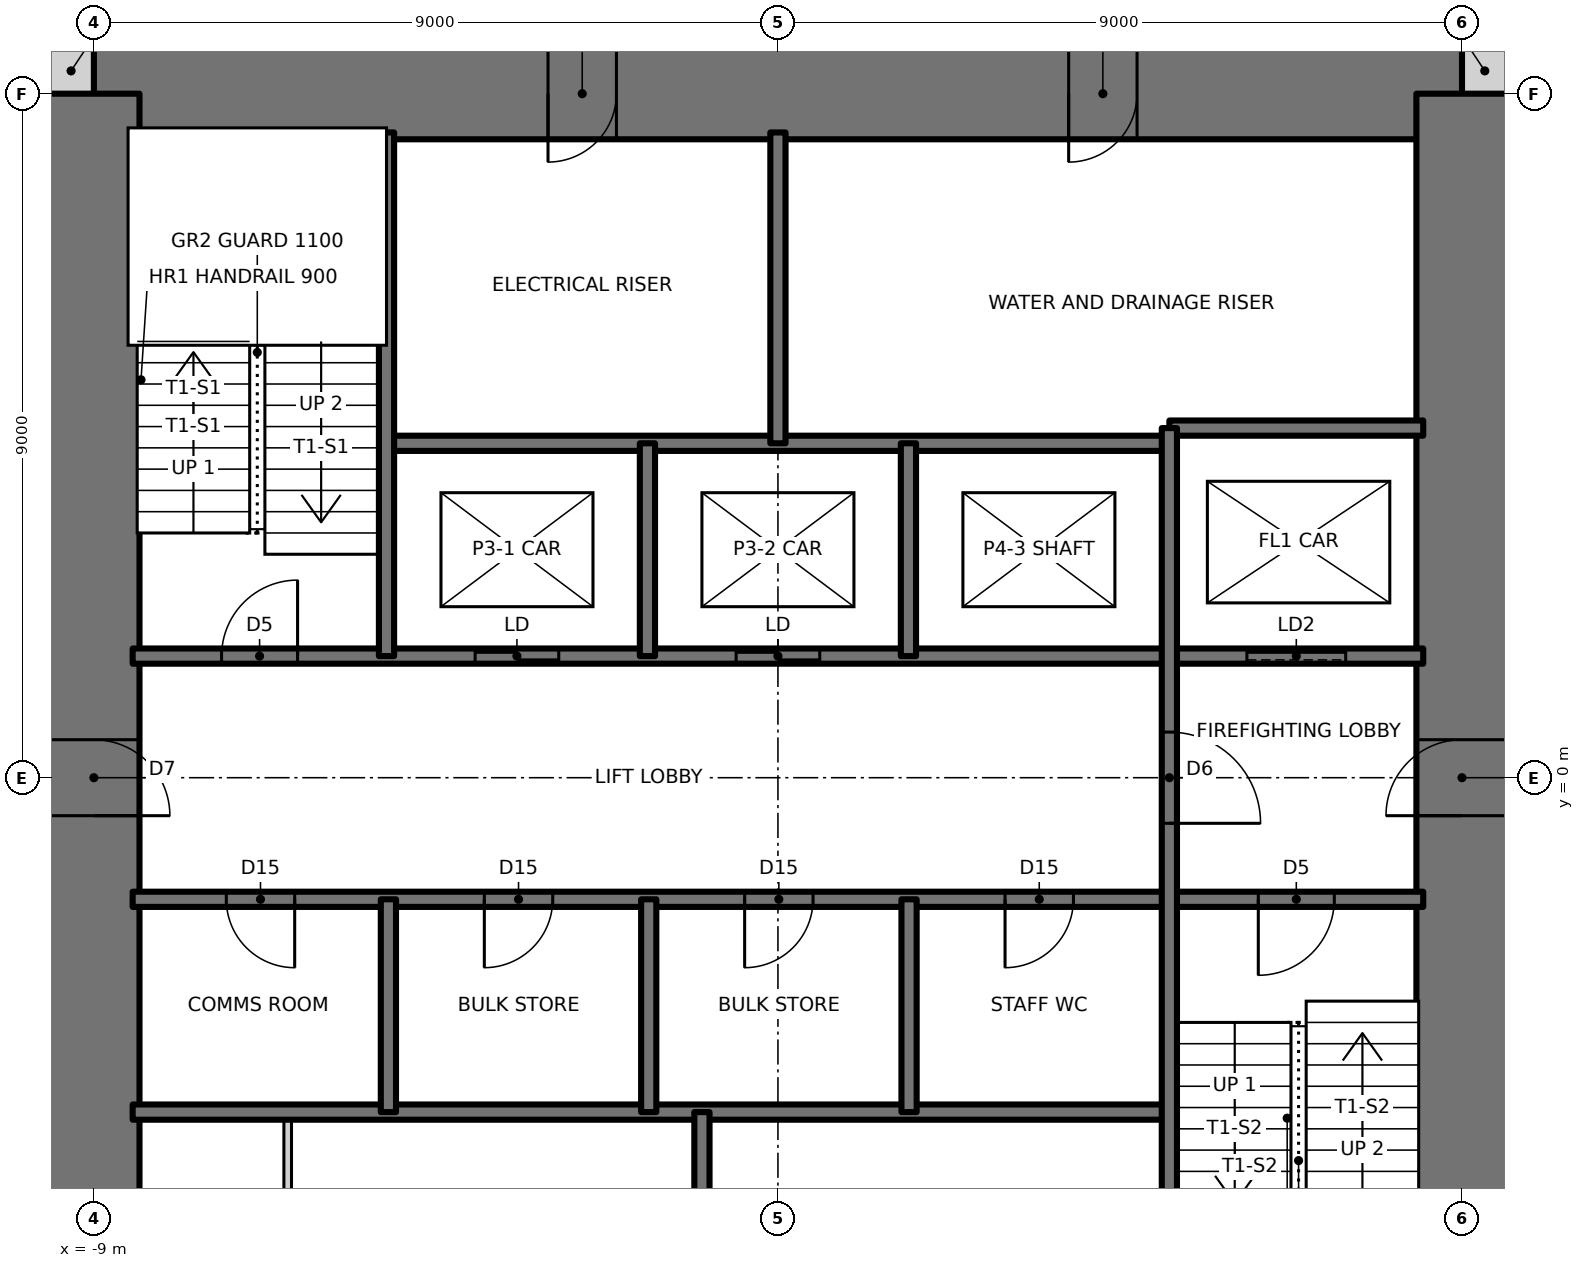
"""IFC4 building model, lengths in metres.
Left out: names, types, materials, properties, quantities, classifications, styles, units other than length and angle.
Written with IfcOpenShell. Run it as: python <this file> out.ifc"""

import sys

from ifc_helpers import new_model, si_unit, direction, frame, frame_2d, origin, place, context, subcontext, project, spatial, rectangle, extrude, element, fill, save


model = new_model("IFC4")
c1 = context("Model", 3, precision=1e-05, world=origin(), true_north=direction((0.0, 1.0)))
c2 = subcontext(c1, "Body", "Model", "MODEL_VIEW")
j1 = project(units=[si_unit("LENGTHUNIT", "METRE"), si_unit("PLANEANGLEUNIT", "RADIAN")], contexts=[c1])
p1 = place(None, origin())
s1 = spatial("IfcSite", under=j1, at=p1, CompositionType="ELEMENT")
p2 = place(p1, origin())
s2 = spatial("IfcBuilding", under=s1, at=p2, CompositionType="ELEMENT")
p3 = place(p2, frame((0.0, 0.0, 181.0)))
s3 = spatial("IfcBuildingStorey", under=s2, at=p3, CompositionType="ELEMENT", Elevation=181.0)
for number, where, z_axis, x_axis in (
    (1, (9.0, 9.3, 0.0), (0.0, 0.0, 1.0), (1.0, 0.0, 0.0)),
    (2, (-9.6, 9.3, 0.0), (0.0, 0.0, 1.0), (1.0, 0.0, 0.0)),
):
    element("IfcWall", number, at=place(p3, frame(where, z_axis=z_axis, x_axis=x_axis)), inside=s3, PredefinedType="SOLIDWALL", context=c2, shape_type="SweptSolid", body=[
        extrude(rectangle(XDim=0.6, YDim=0.6, at=frame_2d((0.3, 0.0))), origin(), (0.0, 0.0, 1.0), 3.5),
    ])
p4 = place(p3, frame((9.0, 9.0, 0.0), z_axis=(0.0, 0.0, 1.0), x_axis=(-1.0, 0.0, 0.0)))
e3 = element("IfcWall", 3, at=p4, inside=s3, PredefinedType="SHEAR", context=c2, shape_type="SweptSolid", body=[
    extrude(rectangle(XDim=18.0, YDim=1.2, at=frame_2d((9.0, 0.0))), origin(), (0.0, 0.0, 1.0), 3.5),
])
p5 = place(p4, frame((11.125, 0.0, 0.0)))
e4 = element("IfcOpeningElement", 4, at=p5, cuts=e3, PredefinedType="OPENING", context=c2, shape_type="SweptSolid", body=[
    extrude(rectangle(XDim=0.9, YDim=2.1, at=frame_2d((0.45, 1.05))), frame((0.0, 0.61, 0.0), z_axis=(0.0, -1.0, 0.0), x_axis=(1.0, 0.0, 0.0)), (0.0, 0.0, 1.0), 1.22),
])
p6 = place(p4, frame((4.275, 0.0, 0.0)))
e5 = element("IfcOpeningElement", 5, at=p6, cuts=e3, PredefinedType="OPENING", context=c2, shape_type="SweptSolid", body=[
    extrude(rectangle(XDim=0.9, YDim=2.1, at=frame_2d((0.45, 1.05))), frame((0.0, 0.61, 0.0), z_axis=(0.0, -1.0, 0.0), x_axis=(1.0, 0.0, 0.0)), (0.0, 0.0, 1.0), 1.22),
])
p7 = place(p3, frame((9.0, -9.0, 0.0), z_axis=(0.0, 0.0, 1.0), x_axis=(0.0, 1.0, 0.0)))
e6 = element("IfcWall", 6, at=p7, inside=s3, PredefinedType="SHEAR", context=c2, shape_type="SweptSolid", body=[
    extrude(rectangle(XDim=18.0, YDim=1.2, at=frame_2d((9.0, 0.0))), origin(), (0.0, 0.0, 1.0), 3.5),
])
p8 = place(p7, frame((8.5, 0.0, 0.0)))
e7 = element("IfcOpeningElement", 7, at=p8, cuts=e6, PredefinedType="OPENING", context=c2, shape_type="SweptSolid", body=[
    extrude(rectangle(XDim=1.0, YDim=2.1, at=frame_2d((0.5, 1.05))), frame((0.0, 0.61, 0.0), z_axis=(0.0, -1.0, 0.0), x_axis=(1.0, 0.0, 0.0)), (0.0, 0.0, 1.0), 1.22),
])
p9 = place(p3, frame((-9.0, 9.0, 0.0), z_axis=(0.0, 0.0, 1.0), x_axis=(0.0, -1.0, 0.0)))
e8 = element("IfcWall", 8, at=p9, inside=s3, PredefinedType="SHEAR", context=c2, shape_type="SweptSolid", body=[
    extrude(rectangle(XDim=18.0, YDim=1.2, at=frame_2d((9.0, 0.0))), origin(), (0.0, 0.0, 1.0), 3.5),
])
p10 = place(p9, frame((8.5, 0.0, 0.0)))
e9 = element("IfcOpeningElement", 9, at=p10, cuts=e8, PredefinedType="OPENING", context=c2, shape_type="SweptSolid", body=[
    extrude(rectangle(XDim=1.0, YDim=2.1, at=frame_2d((0.5, 1.05))), frame((0.0, 0.61, 0.0), z_axis=(0.0, -1.0, 0.0), x_axis=(1.0, 0.0, 0.0)), (0.0, 0.0, 1.0), 1.22),
])
p11 = place(p3, frame((-8.49, -4.4, 0.0), z_axis=(0.0, 0.0, 1.0), x_axis=(1.0, 0.0, 0.0)))
e10 = element("IfcWall", 10, at=p11, inside=s3, PredefinedType="SOLIDWALL", context=c2, shape_type="SweptSolid", body=[
    extrude(rectangle(XDim=13.64, YDim=0.2, at=frame_2d((6.82, 0.0))), origin(), (0.0, 0.0, 1.0), 3.5),
])
p12 = place(p3, frame((-8.49, -1.6, 0.0), z_axis=(0.0, 0.0, 1.0), x_axis=(1.0, 0.0, 0.0)))
e11 = element("IfcWall", 11, at=p12, inside=s3, PredefinedType="SOLIDWALL", context=c2, shape_type="SweptSolid", body=[
    extrude(rectangle(XDim=16.98, YDim=0.2, at=frame_2d((8.49, 0.0))), origin(), (0.0, 0.0, 1.0), 3.5),
])
p13 = place(p12, frame((14.81, 0.0, 0.0)))
e12 = element("IfcOpeningElement", 12, at=p13, cuts=e11, PredefinedType="OPENING", context=c2, shape_type="SweptSolid", body=[
    extrude(rectangle(XDim=1.0, YDim=2.1, at=frame_2d((0.5, 1.05))), frame((0.0, 0.11, 0.0), z_axis=(0.0, -1.0, 0.0), x_axis=(1.0, 0.0, 0.0)), (0.0, 0.0, 1.0), 0.22),
])
p14 = place(p12, frame((1.232, 0.0, 0.0)))
e13 = element("IfcOpeningElement", 13, at=p14, cuts=e11, PredefinedType="OPENING", context=c2, shape_type="SweptSolid", body=[
    extrude(rectangle(XDim=0.9, YDim=2.1, at=frame_2d((0.45, 1.05))), frame((0.0, 0.11, 0.0), z_axis=(0.0, -1.0, 0.0), x_axis=(1.0, 0.0, 0.0)), (0.0, 0.0, 1.0), 0.22),
])
p15 = place(p12, frame((4.627, 0.0, 0.0)))
e14 = element("IfcOpeningElement", 14, at=p15, cuts=e11, PredefinedType="OPENING", context=c2, shape_type="SweptSolid", body=[
    extrude(rectangle(XDim=0.9, YDim=2.1, at=frame_2d((0.45, 1.05))), frame((0.0, 0.11, 0.0), z_axis=(0.0, -1.0, 0.0), x_axis=(1.0, 0.0, 0.0)), (0.0, 0.0, 1.0), 0.22),
])
p16 = place(p12, frame((8.052, 0.0, 0.0)))
e15 = element("IfcOpeningElement", 15, at=p16, cuts=e11, PredefinedType="OPENING", context=c2, shape_type="SweptSolid", body=[
    extrude(rectangle(XDim=0.9, YDim=2.1, at=frame_2d((0.45, 1.05))), frame((0.0, 0.11, 0.0), z_axis=(0.0, -1.0, 0.0), x_axis=(1.0, 0.0, 0.0)), (0.0, 0.0, 1.0), 0.22),
])
p17 = place(p12, frame((11.478, 0.0, 0.0)))
e16 = element("IfcOpeningElement", 16, at=p17, cuts=e11, PredefinedType="OPENING", context=c2, shape_type="SweptSolid", body=[
    extrude(rectangle(XDim=0.9, YDim=2.1, at=frame_2d((0.45, 1.05))), frame((0.0, 0.11, 0.0), z_axis=(0.0, -1.0, 0.0), x_axis=(1.0, 0.0, 0.0)), (0.0, 0.0, 1.0), 0.22),
])
p18 = place(p3, frame((-8.49, 1.6, 0.0), z_axis=(0.0, 0.0, 1.0), x_axis=(1.0, 0.0, 0.0)))
e17 = element("IfcWall", 17, at=p18, inside=s3, PredefinedType="SOLIDWALL", context=c2, shape_type="SweptSolid", body=[
    extrude(rectangle(XDim=16.98, YDim=0.2, at=frame_2d((8.49, 0.0))), origin(), (0.0, 0.0, 1.0), 3.5),
])
p19 = place(p18, frame((1.17, 0.0, 0.0)))
e18 = element("IfcOpeningElement", 18, at=p19, cuts=e17, PredefinedType="OPENING", context=c2, shape_type="SweptSolid", body=[
    extrude(rectangle(XDim=1.0, YDim=2.1, at=frame_2d((0.5, 1.05))), frame((0.0, 0.11, 0.0), z_axis=(0.0, -1.0, 0.0), x_axis=(1.0, 0.0, 0.0)), (0.0, 0.0, 1.0), 0.22),
])
p20 = place(p18, frame((4.506, 0.0, 0.0)))
e19 = element("IfcOpeningElement", 19, at=p20, cuts=e17, PredefinedType="OPENING", context=c2, shape_type="SweptSolid", body=[
    extrude(rectangle(XDim=1.1, YDim=2.1, at=frame_2d((0.55, 1.05))), frame((0.0, 0.11, 0.0), z_axis=(0.0, -1.0, 0.0), x_axis=(1.0, 0.0, 0.0)), (0.0, 0.0, 1.0), 0.22),
])
p21 = place(p18, frame((7.94, 0.0, 0.0)))
e20 = element("IfcOpeningElement", 20, at=p21, cuts=e17, PredefinedType="OPENING", context=c2, shape_type="SweptSolid", body=[
    extrude(rectangle(XDim=1.1, YDim=2.1, at=frame_2d((0.55, 1.05))), frame((0.0, 0.11, 0.0), z_axis=(0.0, -1.0, 0.0), x_axis=(1.0, 0.0, 0.0)), (0.0, 0.0, 1.0), 0.22),
])
p22 = place(p18, frame((14.66, 0.0, 0.0)))
e21 = element("IfcOpeningElement", 21, at=p22, cuts=e17, PredefinedType="OPENING", context=c2, shape_type="SweptSolid", body=[
    extrude(rectangle(XDim=1.3, YDim=2.1, at=frame_2d((0.65, 1.05))), frame((0.0, 0.11, 0.0), z_axis=(0.0, -1.0, 0.0), x_axis=(1.0, 0.0, 0.0)), (0.0, 0.0, 1.0), 0.22),
])
p23 = place(p3, frame((-5.15, 4.4, 0.0), z_axis=(0.0, 0.0, 1.0), x_axis=(1.0, 0.0, 0.0)))
e22 = element("IfcWall", 22, at=p23, inside=s3, PredefinedType="SOLIDWALL", context=c2, shape_type="SweptSolid", body=[
    extrude(rectangle(XDim=10.3, YDim=0.2, at=frame_2d((5.15, 0.0))), origin(), (0.0, 0.0, 1.0), 3.5),
])
p24 = place(p3, frame((5.15, 4.6, 0.0), z_axis=(0.0, 0.0, 1.0), x_axis=(1.0, 0.0, 0.0)))
e23 = element("IfcWall", 23, at=p24, inside=s3, PredefinedType="SOLIDWALL", context=c2, shape_type="SweptSolid", body=[
    extrude(rectangle(XDim=3.34, YDim=0.2, at=frame_2d((1.67, 0.0))), origin(), (0.0, 0.0, 1.0), 3.5),
])
p25 = place(p3, frame((5.15, -8.49, 0.0), z_axis=(0.0, 0.0, 1.0), x_axis=(0.0, 1.0, 0.0)))
e24 = element("IfcWall", 24, at=p25, inside=s3, PredefinedType="SOLIDWALL", context=c2, shape_type="SweptSolid", body=[
    extrude(rectangle(XDim=13.09, YDim=0.2, at=frame_2d((6.545, 0.0))), origin(), (0.0, 0.0, 1.0), 3.5),
])
p26 = place(p25, frame((7.89, 0.0, 0.0)))
e25 = element("IfcOpeningElement", 25, at=p26, cuts=e24, PredefinedType="OPENING", context=c2, shape_type="SweptSolid", body=[
    extrude(rectangle(XDim=1.2, YDim=2.1, at=frame_2d((0.6, 1.05))), frame((0.0, 0.11, 0.0), z_axis=(0.0, -1.0, 0.0), x_axis=(1.0, 0.0, 0.0)), (0.0, 0.0, 1.0), 0.22),
])
for number, where, z_axis, x_axis in (
    (26, (1.725, -4.4, 0.0), (0.0, 0.0, 1.0), (0.0, 1.0, 0.0)),
    (27, (1.717, 1.6, 0.0), (0.0, 0.0, 1.0), (0.0, 1.0, 0.0)),
):
    element("IfcWall", number, at=place(p3, frame(where, z_axis=z_axis, x_axis=x_axis)), inside=s3, PredefinedType="SOLIDWALL", context=c2, shape_type="SweptSolid", body=[
        extrude(rectangle(XDim=2.8, YDim=0.2, at=frame_2d((1.4, 0.0))), origin(), (0.0, 0.0, 1.0), 3.5),
    ])
for number, where, z_axis, x_axis in (
    (28, (0.0, 4.4, 0.0), (0.0, 0.0, 1.0), (0.0, 1.0, 0.0)),
    (29, (-1.0, -8.49, 0.0), (0.0, 0.0, 1.0), (0.0, 1.0, 0.0)),
):
    element("IfcWall", number, at=place(p3, frame(where, z_axis=z_axis, x_axis=x_axis)), inside=s3, PredefinedType="SOLIDWALL", context=c2, shape_type="SweptSolid", body=[
        extrude(rectangle(XDim=4.09, YDim=0.2, at=frame_2d((2.045, 0.0))), origin(), (0.0, 0.0, 1.0), 3.5),
    ])
for number, where, z_axis, x_axis in (
    (30, (-1.7, -4.4, 0.0), (0.0, 0.0, 1.0), (0.0, 1.0, 0.0)),
    (31, (-1.717, 1.6, 0.0), (0.0, 0.0, 1.0), (0.0, 1.0, 0.0)),
    (32, (-5.125, -4.4, 0.0), (0.0, 0.0, 1.0), (0.0, 1.0, 0.0)),
):
    element("IfcWall", number, at=place(p3, frame(where, z_axis=z_axis, x_axis=x_axis)), inside=s3, PredefinedType="SOLIDWALL", context=c2, shape_type="SweptSolid", body=[
        extrude(rectangle(XDim=2.8, YDim=0.2, at=frame_2d((1.4, 0.0))), origin(), (0.0, 0.0, 1.0), 3.5),
    ])
p27 = place(p3, frame((-5.15, 1.6, 0.0), z_axis=(0.0, 0.0, 1.0), x_axis=(0.0, 1.0, 0.0)))
e33 = element("IfcWall", 33, at=p27, inside=s3, PredefinedType="SOLIDWALL", context=c2, shape_type="SweptSolid", body=[
    extrude(rectangle(XDim=6.89, YDim=0.2, at=frame_2d((3.445, 0.0))), origin(), (0.0, 0.0, 1.0), 3.5),
])
p28 = place(p3, frame((-6.45, -8.49, 0.0), z_axis=(0.0, 0.0, 1.0), x_axis=(0.0, 1.0, 0.0)))
e34 = element("IfcWall", 34, at=p28, inside=s3, PredefinedType="PARTITIONING", context=c2, shape_type="SweptSolid", body=[
    extrude(rectangle(XDim=4.09, YDim=0.1, at=frame_2d((2.045, 0.0))), origin(), (0.0, 0.0, 1.0), 3.3),
])
p29 = place(p28, frame((1.595, 0.0, 0.0)))
e35 = element("IfcOpeningElement", 35, at=p29, cuts=e34, PredefinedType="OPENING", context=c2, shape_type="SweptSolid", body=[
    extrude(rectangle(XDim=0.9, YDim=2.1, at=frame_2d((0.45, 1.05))), frame((0.0, 0.06, 0.0), z_axis=(0.0, -1.0, 0.0), x_axis=(1.0, 0.0, 0.0)), (0.0, 0.0, 1.0), 0.12),
])
p30 = place(p19, origin())
e36 = element("IfcDoor", 36, at=p30, inside=s3, OperationType="SINGLE_SWING_RIGHT", PredefinedType="DOOR", context=c2, shape_type="SweptSolid", body=[
    extrude(rectangle(XDim=1.0, YDim=2.1, at=frame_2d((0.5, 1.05))), frame((0.0, 0.025, 0.0), z_axis=(0.0, -1.0, 0.0), x_axis=(1.0, 0.0, 0.0)), (0.0, 0.0, 1.0), 0.05),
])
fill(e18, e36)
p31 = place(p13, frame((1.0, 0.0, 0.0), z_axis=(0.0, 0.0, 1.0), x_axis=(-1.0, 0.0, 0.0)))
e37 = element("IfcDoor", 37, at=p31, inside=s3, OperationType="SINGLE_SWING_RIGHT", PredefinedType="DOOR", context=c2, shape_type="SweptSolid", body=[
    extrude(rectangle(XDim=1.0, YDim=2.1, at=frame_2d((0.5, 1.05))), frame((0.0, 0.025, 0.0), z_axis=(0.0, -1.0, 0.0), x_axis=(1.0, 0.0, 0.0)), (0.0, 0.0, 1.0), 0.05),
])
fill(e12, e37)
p32 = place(p26, frame((1.2, 0.0, 0.0), z_axis=(0.0, 0.0, 1.0), x_axis=(-1.0, 0.0, 0.0)))
e38 = element("IfcDoor", 38, at=p32, inside=s3, OperationType="SINGLE_SWING_RIGHT", PredefinedType="DOOR", context=c2, shape_type="SweptSolid", body=[
    extrude(rectangle(XDim=1.2, YDim=2.1, at=frame_2d((0.6, 1.05))), frame((0.0, 0.025, 0.0), z_axis=(0.0, -1.0, 0.0), x_axis=(1.0, 0.0, 0.0)), (0.0, 0.0, 1.0), 0.05),
])
fill(e25, e38)
p33 = place(p14, frame((0.9, 0.0, 0.0), z_axis=(0.0, 0.0, 1.0), x_axis=(-1.0, 0.0, 0.0)))
e39 = element("IfcDoor", 39, at=p33, inside=s3, OperationType="SINGLE_SWING_LEFT", PredefinedType="DOOR", context=c2, shape_type="SweptSolid", body=[
    extrude(rectangle(XDim=0.9, YDim=2.1, at=frame_2d((0.45, 1.05))), frame((0.0, 0.025, 0.0), z_axis=(0.0, -1.0, 0.0), x_axis=(1.0, 0.0, 0.0)), (0.0, 0.0, 1.0), 0.05),
])
fill(e13, e39)
p34 = place(p15, frame((0.9, 0.0, 0.0), z_axis=(0.0, 0.0, 1.0), x_axis=(-1.0, 0.0, 0.0)))
e40 = element("IfcDoor", 40, at=p34, inside=s3, OperationType="SINGLE_SWING_RIGHT", PredefinedType="DOOR", context=c2, shape_type="SweptSolid", body=[
    extrude(rectangle(XDim=0.9, YDim=2.1, at=frame_2d((0.45, 1.05))), frame((0.0, 0.025, 0.0), z_axis=(0.0, -1.0, 0.0), x_axis=(1.0, 0.0, 0.0)), (0.0, 0.0, 1.0), 0.05),
])
fill(e14, e40)
p35 = place(p16, frame((0.9, 0.0, 0.0), z_axis=(0.0, 0.0, 1.0), x_axis=(-1.0, 0.0, 0.0)))
e41 = element("IfcDoor", 41, at=p35, inside=s3, OperationType="SINGLE_SWING_RIGHT", PredefinedType="DOOR", context=c2, shape_type="SweptSolid", body=[
    extrude(rectangle(XDim=0.9, YDim=2.1, at=frame_2d((0.45, 1.05))), frame((0.0, 0.025, 0.0), z_axis=(0.0, -1.0, 0.0), x_axis=(1.0, 0.0, 0.0)), (0.0, 0.0, 1.0), 0.05),
])
fill(e15, e41)
p36 = place(p17, frame((0.9, 0.0, 0.0), z_axis=(0.0, 0.0, 1.0), x_axis=(-1.0, 0.0, 0.0)))
e42 = element("IfcDoor", 42, at=p36, inside=s3, OperationType="SINGLE_SWING_RIGHT", PredefinedType="DOOR", context=c2, shape_type="SweptSolid", body=[
    extrude(rectangle(XDim=0.9, YDim=2.1, at=frame_2d((0.45, 1.05))), frame((0.0, 0.025, 0.0), z_axis=(0.0, -1.0, 0.0), x_axis=(1.0, 0.0, 0.0)), (0.0, 0.0, 1.0), 0.05),
])
fill(e16, e42)
p37 = place(p10, origin())
e43 = element("IfcDoor", 43, at=p37, inside=s3, OperationType="SINGLE_SWING_RIGHT", PredefinedType="DOOR", context=c2, shape_type="SweptSolid", body=[
    extrude(rectangle(XDim=1.0, YDim=2.1, at=frame_2d((0.5, 1.05))), frame((0.0, 0.025, 0.0), z_axis=(0.0, -1.0, 0.0), x_axis=(1.0, 0.0, 0.0)), (0.0, 0.0, 1.0), 0.05),
])
fill(e9, e43)
p38 = place(p8, origin())
e44 = element("IfcDoor", 44, at=p38, inside=s3, OperationType="SINGLE_SWING_LEFT", PredefinedType="DOOR", context=c2, shape_type="SweptSolid", body=[
    extrude(rectangle(XDim=1.0, YDim=2.1, at=frame_2d((0.5, 1.05))), frame((0.0, 0.025, 0.0), z_axis=(0.0, -1.0, 0.0), x_axis=(1.0, 0.0, 0.0)), (0.0, 0.0, 1.0), 0.05),
])
fill(e7, e44)
p39 = place(p5, origin())
e45 = element("IfcDoor", 45, at=p39, inside=s3, OperationType="SINGLE_SWING_RIGHT", PredefinedType="DOOR", context=c2, shape_type="SweptSolid", body=[
    extrude(rectangle(XDim=0.9, YDim=2.1, at=frame_2d((0.45, 1.05))), frame((0.0, 0.025, 0.0), z_axis=(0.0, -1.0, 0.0), x_axis=(1.0, 0.0, 0.0)), (0.0, 0.0, 1.0), 0.05),
])
fill(e4, e45)
p40 = place(p6, origin())
e46 = element("IfcDoor", 46, at=p40, inside=s3, OperationType="SINGLE_SWING_RIGHT", PredefinedType="DOOR", context=c2, shape_type="SweptSolid", body=[
    extrude(rectangle(XDim=0.9, YDim=2.1, at=frame_2d((0.45, 1.05))), frame((0.0, 0.025, 0.0), z_axis=(0.0, -1.0, 0.0), x_axis=(1.0, 0.0, 0.0)), (0.0, 0.0, 1.0), 0.05),
])
fill(e5, e46)
p41 = place(p20, origin())
e47 = element("IfcDoor", 47, at=p41, inside=s3, OperationType="DOUBLE_DOOR_SLIDING", PredefinedType="DOOR", context=c2, shape_type="SweptSolid", body=[
    extrude(rectangle(XDim=1.1, YDim=2.1, at=frame_2d((0.55, 1.05))), frame((0.0, 0.025, 0.0), z_axis=(0.0, -1.0, 0.0), x_axis=(1.0, 0.0, 0.0)), (0.0, 0.0, 1.0), 0.05),
])
fill(e19, e47)
p42 = place(p21, origin())
e48 = element("IfcDoor", 48, at=p42, inside=s3, OperationType="DOUBLE_DOOR_SLIDING", PredefinedType="DOOR", context=c2, shape_type="SweptSolid", body=[
    extrude(rectangle(XDim=1.1, YDim=2.1, at=frame_2d((0.55, 1.05))), frame((0.0, 0.025, 0.0), z_axis=(0.0, -1.0, 0.0), x_axis=(1.0, 0.0, 0.0)), (0.0, 0.0, 1.0), 0.05),
])
fill(e20, e48)
p43 = place(p22, origin())
e49 = element("IfcDoor", 49, at=p43, inside=s3, OperationType="SLIDING_TO_LEFT", PredefinedType="DOOR", context=c2, shape_type="SweptSolid", body=[
    extrude(rectangle(XDim=1.3, YDim=2.1, at=frame_2d((0.65, 1.05))), frame((0.0, 0.025, 0.0), z_axis=(0.0, -1.0, 0.0), x_axis=(1.0, 0.0, 0.0)), (0.0, 0.0, 1.0), 0.05),
])
fill(e21, e49)
save(model, sys.argv[1])
